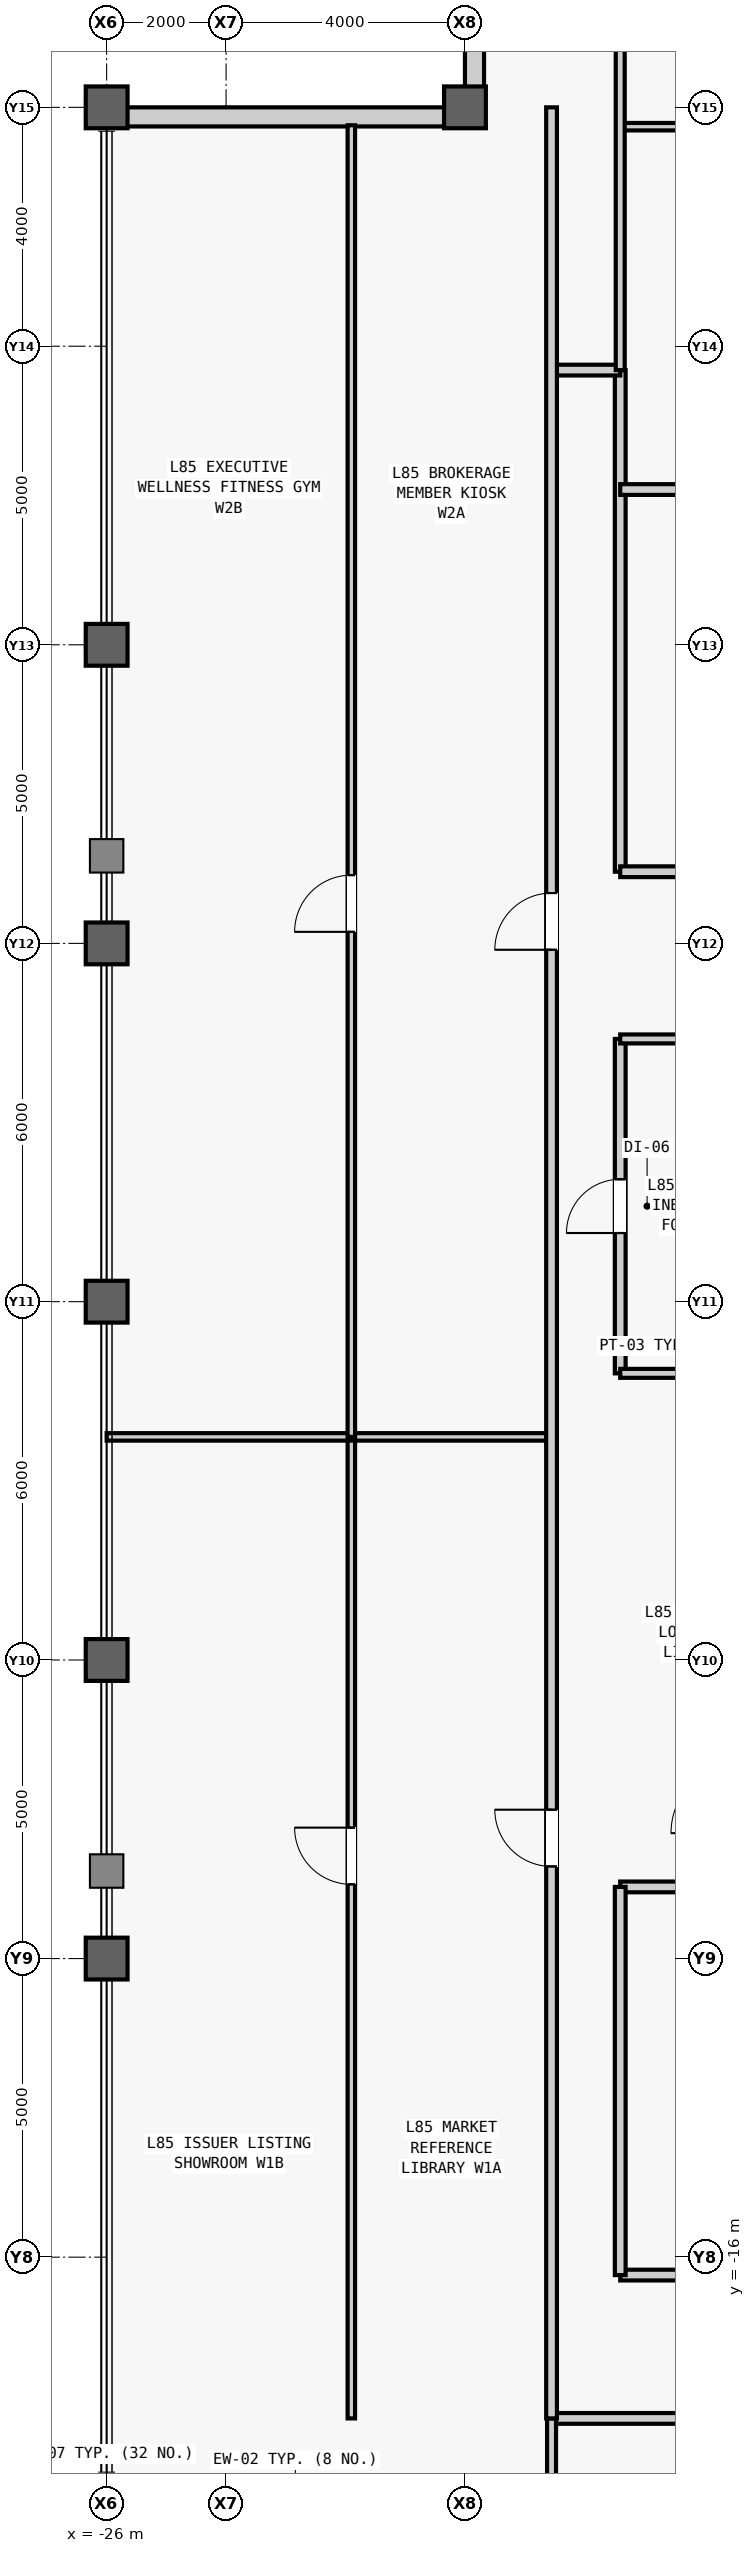
"""IFC4 building model, lengths in metres.
Left out: names, types, materials, properties, quantities, classifications, styles, units other than length and angle.
Written with IfcOpenShell. Run it as: python <this file> out.ifc"""

import sys

from ifc_helpers import new_model, si_unit, direction, frame, frame_2d, origin, origin_2d, place, context, subcontext, project, spatial, rectangle, hollow_rectangle, extrude, source, transform, mapped, element, fill, save


model = new_model("IFC4")
c1 = context("Model", 3, precision=1e-05, world=origin(), true_north=direction((0.0, 1.0)))
c2 = subcontext(c1, "Body", "Model", "MODEL_VIEW")
j1 = project(units=[si_unit("LENGTHUNIT", "METRE"), si_unit("PLANEANGLEUNIT", "RADIAN")], contexts=[c1])
p1 = place(None, origin())
s1 = spatial("IfcSite", under=j1, at=p1, CompositionType="ELEMENT")
p2 = place(p1, origin())
s2 = spatial("IfcBuilding", under=s1, at=p2, CompositionType="ELEMENT")
p3 = place(p2, frame((0.0, 0.0, 358.3)))
s3 = spatial("IfcBuildingStorey", under=s2, at=p3, CompositionType="ELEMENT", Elevation=358.3)
m1 = source(origin(), c2, "Body", "SweptSolid", [
    extrude(hollow_rectangle(XDim=0.7, YDim=0.7, WallThickness=0.04, at=origin_2d()), origin(), (0.0, 0.0, 1.0), 4.0),
])
for number, where, z_axis, x_axis in (
    (1, (-26.0, -11.0, 0.0), (0.0, 0.0, 1.0), (1.0, 0.0, 0.0)),
    (2, (-26.0, -6.0, 0.0), (0.0, 0.0, 1.0), (1.0, 0.0, 0.0)),
    (3, (-26.0, 0.0, 0.0), (0.0, 0.0, 1.0), (1.0, 0.0, 0.0)),
    (4, (-26.0, 6.0, 0.0), (0.0, 0.0, 1.0), (1.0, 0.0, 0.0)),
    (5, (-26.0, 11.0, 0.0), (0.0, 0.0, 1.0), (1.0, 0.0, 0.0)),
    (6, (-26.0, 20.0, 0.0), (0.0, 0.0, 1.0), (1.0, 0.0, 0.0)),
    (7, (-20.0, 20.0, 0.0), (0.0, 0.0, 1.0), (1.0, 0.0, 0.0)),
):
    element("IfcColumn", number, at=place(p3, frame(where, z_axis=z_axis, x_axis=x_axis)), inside=s3, PredefinedType="COLUMN", context=c2, shape_type="MappedRepresentation", body=[
        mapped(m1, transform((0.0, 0.0, 0.0), scale=1.0)),
    ])
m2 = source(origin(), c2, "Body", "SweptSolid", [
    extrude(rectangle(XDim=5.68, YDim=0.32, at=frame_2d((2.84, 0.0))), origin(), (0.0, 0.0, 1.0), 3.191),
])
p4 = place(p3, frame((-19.84, 20.0, 0.0), z_axis=(0.0, 0.0, 1.0), x_axis=(0.0, 1.0, 0.0)))
e8 = element("IfcWall", 8, at=p4, inside=s3, PredefinedType="STANDARD", context=c2, shape_type="MappedRepresentation", body=[
    mapped(m2, transform((0.0, 0.0, 0.0), scale=1.0)),
])
m3 = source(origin(), c2, "Body", "SweptSolid", [
    extrude(rectangle(XDim=1.8, YDim=2.4, at=frame_2d((0.9, 1.2))), frame((0.0, 0.17, 0.0), z_axis=(0.0, -1.0, 0.0), x_axis=(1.0, 0.0, 0.0)), (0.0, 0.0, 1.0), 0.34),
])
p5 = place(p4, frame((1.94, 0.0, 0.5)))
e9 = element("IfcOpeningElement", 9, at=p5, cuts=e8, PredefinedType="OPENING", context=c2, shape_type="MappedRepresentation", body=[
    mapped(m3, transform((0.0, 0.0, 0.0), scale=1.0)),
])
p6 = place(p3, frame((-20.0, 19.84, 0.0), z_axis=(0.0, 0.0, 1.0), x_axis=(-1.0, 0.0, 0.0)))
e10 = element("IfcWall", 10, at=p6, inside=s3, PredefinedType="STANDARD", context=c2, shape_type="MappedRepresentation", body=[
    mapped(m2, transform((0.0, 0.0, 0.0), scale=1.0)),
])
m4 = source(origin(), c2, "Body", "SweptSolid", [
    extrude(rectangle(XDim=5.6, YDim=0.18, at=frame_2d((2.8, 0.0))), origin(), (0.0, 0.0, 1.0), 3.74),
])
p7 = place(p3, frame((-17.4, -1.2, 0.0), z_axis=(0.0, 0.0, 1.0), x_axis=(0.0, 1.0, 0.0)))
e11 = element("IfcWall", 11, at=p7, inside=s3, PredefinedType="PARTITIONING", context=c2, shape_type="MappedRepresentation", body=[
    mapped(m4, transform((0.0, 0.0, 0.0), scale=1.0)),
])
m5 = source(origin(), c2, "Body", "SweptSolid", [
    extrude(rectangle(XDim=0.9, YDim=2.15, at=frame_2d((0.45, 1.075))), frame((0.0, 0.1, 0.0), z_axis=(0.0, -1.0, 0.0), x_axis=(1.0, 0.0, 0.0)), (0.0, 0.0, 1.0), 0.2),
])
p8 = place(p7, frame((2.35, 0.0, 0.0)))
e12 = element("IfcOpeningElement", 12, at=p8, cuts=e11, PredefinedType="OPENING", context=c2, shape_type="MappedRepresentation", body=[
    mapped(m5, transform((0.0, 0.0, 0.0), scale=1.0)),
])
m6 = source(origin(), c2, "Body", "SweptSolid", [
    extrude(rectangle(XDim=2.05, YDim=0.15, at=frame_2d((1.025, 0.0))), origin(), (0.0, 0.0, 1.0), 3.74),
])
for number, where, z_axis, x_axis in (
    (13, (-17.4, -1.2, 0.0), (0.0, 0.0, 1.0), (1.0, 0.0, 0.0)),
    (14, (-17.4, 4.4, 0.0), (0.0, 0.0, 1.0), (1.0, 0.0, 0.0)),
):
    element("IfcWall", number, at=place(p3, frame(where, z_axis=z_axis, x_axis=x_axis)), inside=s3, PredefinedType="PARTITIONING", context=c2, shape_type="MappedRepresentation", body=[
        mapped(m6, transform((0.0, 0.0, 0.0), scale=1.0)),
    ])
m7 = source(origin(), c2, "Body", "SweptSolid", [
    extrude(rectangle(XDim=2.05, YDim=0.18, at=frame_2d((1.025, 0.0))), origin(), (0.0, 0.0, 1.0), 3.74),
])
p9 = place(p3, frame((-17.4, -9.8, 0.0), z_axis=(0.0, 0.0, 1.0), x_axis=(1.0, 0.0, 0.0)))
e15 = element("IfcWall", 15, at=p9, inside=s3, PredefinedType="PARTITIONING", context=c2, shape_type="MappedRepresentation", body=[
    mapped(m7, transform((0.0, 0.0, 0.0), scale=1.0)),
])
m8 = source(origin(), c2, "Body", "SweptSolid", [
    extrude(rectangle(XDim=8.4, YDim=0.18, at=frame_2d((4.2, 0.0))), origin(), (0.0, 0.0, 1.0), 3.74),
])
p10 = place(p3, frame((-17.4, 7.2, 0.0), z_axis=(0.0, 0.0, 1.0), x_axis=(0.0, 1.0, 0.0)))
e16 = element("IfcWall", 16, at=p10, inside=s3, PredefinedType="PARTITIONING", context=c2, shape_type="MappedRepresentation", body=[
    mapped(m8, transform((0.0, 0.0, 0.0), scale=1.0)),
])
p11 = place(p3, frame((-17.4, 7.2, 0.0), z_axis=(0.0, 0.0, 1.0), x_axis=(1.0, 0.0, 0.0)))
e17 = element("IfcWall", 17, at=p11, inside=s3, PredefinedType="PARTITIONING", context=c2, shape_type="MappedRepresentation", body=[
    mapped(m7, transform((0.0, 0.0, 0.0), scale=1.0)),
])
m9 = source(origin(), c2, "Body", "SweptSolid", [
    extrude(rectangle(XDim=16.1, YDim=0.18, at=frame_2d((8.05, 0.0))), origin(), (0.0, 0.0, 1.0), 3.74),
])
p12 = place(p3, frame((-17.4, -16.3, 0.0), z_axis=(0.0, 0.0, 1.0), x_axis=(1.0, 0.0, 0.0)))
e18 = element("IfcWall", 18, at=p12, inside=s3, PredefinedType="PARTITIONING", context=c2, shape_type="MappedRepresentation", body=[
    mapped(m9, transform((0.0, 0.0, 0.0), scale=1.0)),
])
p13 = place(p12, frame((8.95, 0.0, 0.0)))
e19 = element("IfcOpeningElement", 19, at=p13, cuts=e18, PredefinedType="OPENING", context=c2, shape_type="MappedRepresentation", body=[
    mapped(m5, transform((0.0, 0.0, 0.0), scale=1.0)),
])
m10 = source(origin(), c2, "Body", "SweptSolid", [
    extrude(rectangle(XDim=6.5, YDim=0.18, at=frame_2d((3.25, 0.0))), origin(), (0.0, 0.0, 1.0), 3.74),
])
p14 = place(p3, frame((-17.4, -16.3, 0.0), z_axis=(0.0, 0.0, 1.0), x_axis=(0.0, 1.0, 0.0)))
e20 = element("IfcWall", 20, at=p14, inside=s3, PredefinedType="PARTITIONING", context=c2, shape_type="MappedRepresentation", body=[
    mapped(m10, transform((0.0, 0.0, 0.0), scale=1.0)),
])
m11 = source(origin(), c2, "Body", "SweptSolid", [
    extrude(rectangle(XDim=1.15, YDim=0.18, at=frame_2d((0.575, 0.0))), origin(), (0.0, 0.0, 1.0), 3.74),
])
p15 = place(p3, frame((-18.55, 15.6, 0.0), z_axis=(0.0, 0.0, 1.0), x_axis=(1.0, 0.0, 0.0)))
e21 = element("IfcWall", 21, at=p15, inside=s3, PredefinedType="PARTITIONING", context=c2, shape_type="MappedRepresentation", body=[
    mapped(m11, transform((0.0, 0.0, 0.0), scale=1.0)),
])
m12 = source(origin(), c2, "Body", "SweptSolid", [
    extrude(rectangle(XDim=36.3, YDim=0.18, at=frame_2d((18.15, 0.0))), origin(), (0.0, 0.0, 1.0), 3.74),
])
p16 = place(p3, frame((-18.55, -18.7, 0.0), z_axis=(0.0, 0.0, 1.0), x_axis=(1.0, 0.0, 0.0)))
e22 = element("IfcWall", 22, at=p16, inside=s3, PredefinedType="PARTITIONING", context=c2, shape_type="MappedRepresentation", body=[
    mapped(m12, transform((0.0, 0.0, 0.0), scale=1.0)),
])
m13 = source(origin(), c2, "Body", "SweptSolid", [
    extrude(rectangle(XDim=1.05, YDim=2.2, at=frame_2d((0.525, 1.1))), frame((0.0, 0.1, 0.0), z_axis=(0.0, -1.0, 0.0), x_axis=(1.0, 0.0, 0.0)), (0.0, 0.0, 1.0), 0.2),
])
p17 = place(p16, frame((17.6, 0.0, 0.0)))
e23 = element("IfcOpeningElement", 23, at=p17, cuts=e22, PredefinedType="OPENING", context=c2, shape_type="MappedRepresentation", body=[
    mapped(m13, transform((0.0, 0.0, 0.0), scale=1.0)),
])
m14 = source(origin(), c2, "Body", "SweptSolid", [
    extrude(rectangle(XDim=7.3, YDim=0.15, at=frame_2d((3.65, 0.0))), origin(), (0.0, 0.0, 1.0), 3.74),
])
p18 = place(p3, frame((-18.55, -26.0, 0.0), z_axis=(0.0, 0.0, 1.0), x_axis=(0.0, 1.0, 0.0)))
e24 = element("IfcWall", 24, at=p18, inside=s3, PredefinedType="PARTITIONING", context=c2, shape_type="MappedRepresentation", body=[
    mapped(m14, transform((0.0, 0.0, 0.0), scale=1.0)),
])
m15 = source(origin(), c2, "Body", "SweptSolid", [
    extrude(rectangle(XDim=7.205, YDim=0.125, at=frame_2d((3.603, 0.0))), origin(), (0.0, 0.0, 1.0), 3.393),
])
p19 = place(p3, frame((-17.4, 19.676, 0.0), z_axis=(0.0, 0.0, 1.0), x_axis=(1.0, 0.0, 0.0)))
e25 = element("IfcWall", 25, at=p19, inside=s3, PredefinedType="PARTITIONING", context=c2, shape_type="MappedRepresentation", body=[
    mapped(m15, transform((0.0, 0.0, 0.0), scale=1.0)),
])
m16 = source(origin(), c2, "Body", "SweptSolid", [
    extrude(rectangle(XDim=0.95, YDim=2.15, at=frame_2d((0.475, 1.075))), frame((0.0, 0.073, 0.0), z_axis=(0.0, -1.0, 0.0), x_axis=(1.0, 0.0, 0.0)), (0.0, 0.0, 1.0), 0.145),
])
p20 = place(p19, frame((3.127, 0.0, 0.0)))
e26 = element("IfcOpeningElement", 26, at=p20, cuts=e25, PredefinedType="OPENING", context=c2, shape_type="MappedRepresentation", body=[
    mapped(m16, transform((0.0, 0.0, 0.0), scale=1.0)),
])
m17 = source(origin(), c2, "Body", "SweptSolid", [
    extrude(rectangle(XDim=32.75, YDim=0.18, at=frame_2d((16.375, 0.0))), origin(), (0.0, 0.0, 1.0), 3.74),
])
p21 = place(p3, frame((-17.4, 13.6, 0.0), z_axis=(0.0, 0.0, 1.0), x_axis=(1.0, 0.0, 0.0)))
e27 = element("IfcWall", 27, at=p21, inside=s3, PredefinedType="PARTITIONING", context=c2, shape_type="MappedRepresentation", body=[
    mapped(m17, transform((0.0, 0.0, 0.0), scale=1.0)),
])
p22 = place(p21, frame((23.948, 0.0, 0.0)))
e28 = element("IfcOpeningElement", 28, at=p22, cuts=e27, PredefinedType="OPENING", context=c2, shape_type="MappedRepresentation", body=[
    mapped(m13, transform((0.0, 0.0, 0.0), scale=1.0)),
])
p23 = place(p21, frame((28.147, 0.0, 0.0)))
e29 = element("IfcOpeningElement", 29, at=p23, cuts=e27, PredefinedType="OPENING", context=c2, shape_type="MappedRepresentation", body=[
    mapped(m13, transform((0.0, 0.0, 0.0), scale=1.0)),
])
m18 = source(origin(), c2, "Body", "SweptSolid", [
    extrude(rectangle(XDim=10.4, YDim=0.15, at=frame_2d((5.2, 0.0))), origin(), (0.0, 0.0, 1.0), 3.74),
])
p24 = place(p3, frame((-17.4, 15.6, 0.0), z_axis=(0.0, 0.0, 1.0), x_axis=(0.0, 1.0, 0.0)))
e30 = element("IfcWall", 30, at=p24, inside=s3, PredefinedType="PARTITIONING", context=c2, shape_type="MappedRepresentation", body=[
    mapped(m18, transform((0.0, 0.0, 0.0), scale=1.0)),
])
m19 = source(origin(), c2, "Body", "SweptSolid", [
    extrude(rectangle(XDim=16.436, YDim=0.125, at=frame_2d((8.218, 0.0))), origin(), (0.0, 0.0, 1.0), 3.74),
])
p25 = place(p3, frame((-21.903, -18.7, 0.0), z_axis=(0.0, 0.0, 1.0), x_axis=(0.0, 1.0, 0.0)))
e31 = element("IfcWall", 31, at=p25, inside=s3, PredefinedType="PARTITIONING", context=c2, shape_type="MappedRepresentation", body=[
    mapped(m19, transform((0.0, 0.0, 0.0), scale=1.0)),
])
p26 = place(p25, frame((8.943, 0.0, 0.0)))
e32 = element("IfcOpeningElement", 32, at=p26, cuts=e31, PredefinedType="OPENING", context=c2, shape_type="MappedRepresentation", body=[
    mapped(m16, transform((0.0, 0.0, 0.0), scale=1.0)),
])
m20 = source(origin(), c2, "Body", "SweptSolid", [
    extrude(rectangle(XDim=7.45, YDim=0.125, at=frame_2d((3.725, 0.0))), origin(), (0.0, 0.0, 1.0), 3.74),
])
p27 = place(p3, frame((-26.0, -2.264, 0.0), z_axis=(0.0, 0.0, 1.0), x_axis=(1.0, 0.0, 0.0)))
e33 = element("IfcWall", 33, at=p27, inside=s3, PredefinedType="PARTITIONING", context=c2, shape_type="MappedRepresentation", body=[
    mapped(m20, transform((0.0, 0.0, 0.0), scale=1.0)),
])
m21 = source(origin(), c2, "Body", "SweptSolid", [
    extrude(rectangle(XDim=21.964, YDim=0.125, at=frame_2d((10.982, 0.0))), origin(), (0.0, 0.0, 1.0), 3.74),
])
p28 = place(p3, frame((-21.903, -2.264, 0.0), z_axis=(0.0, 0.0, 1.0), x_axis=(0.0, 1.0, 0.0)))
e34 = element("IfcWall", 34, at=p28, inside=s3, PredefinedType="PARTITIONING", context=c2, shape_type="MappedRepresentation", body=[
    mapped(m21, transform((0.0, 0.0, 0.0), scale=1.0)),
])
p29 = place(p28, frame((8.457, 0.0, 0.0)))
e35 = element("IfcOpeningElement", 35, at=p29, cuts=e34, PredefinedType="OPENING", context=c2, shape_type="MappedRepresentation", body=[
    mapped(m16, transform((0.0, 0.0, 0.0), scale=1.0)),
])
m22 = source(origin(), c2, "Body", "SweptSolid", [
    extrude(rectangle(XDim=38.7, YDim=0.18, at=frame_2d((19.35, 0.0))), origin(), (0.0, 0.0, 1.0), 3.74),
])
p30 = place(p3, frame((-18.55, -18.7, 0.0), z_axis=(0.0, 0.0, 1.0), x_axis=(0.0, 1.0, 0.0)))
e36 = element("IfcWall", 36, at=p30, inside=s3, PredefinedType="PARTITIONING", context=c2, shape_type="MappedRepresentation", body=[
    mapped(m22, transform((0.0, 0.0, 0.0), scale=1.0)),
])
m23 = source(origin(), c2, "Body", "SweptSolid", [
    extrude(rectangle(XDim=0.95, YDim=2.15, at=frame_2d((0.475, 1.075))), frame((0.0, 0.1, 0.0), z_axis=(0.0, -1.0, 0.0), x_axis=(1.0, 0.0, 0.0)), (0.0, 0.0, 1.0), 0.2),
])
p31 = place(p30, frame((9.243, 0.0, 0.0)))
e37 = element("IfcOpeningElement", 37, at=p31, cuts=e36, PredefinedType="OPENING", context=c2, shape_type="MappedRepresentation", body=[
    mapped(m23, transform((0.0, 0.0, 0.0), scale=1.0)),
])
p32 = place(p30, frame((24.593, 0.0, 0.0)))
e38 = element("IfcOpeningElement", 38, at=p32, cuts=e36, PredefinedType="OPENING", context=c2, shape_type="MappedRepresentation", body=[
    mapped(m23, transform((0.0, 0.0, 0.0), scale=1.0)),
])
m24 = source(origin(), c2, "Body", "SweptSolid", [
    extrude(rectangle(XDim=0.9, YDim=2.15, at=frame_2d((0.45, 1.075))), frame((0.0, 0.025, 0.0), z_axis=(0.0, -1.0, 0.0), x_axis=(1.0, 0.0, 0.0)), (0.0, 0.0, 1.0), 0.05),
])
p33 = place(p8, origin())
e39 = element("IfcDoor", 39, at=p33, inside=s3, OperationType="SINGLE_SWING_LEFT", PredefinedType="DOOR", context=c2, shape_type="MappedRepresentation", body=[
    mapped(m24, transform((0.0, 0.0, 0.0), scale=1.0)),
])
fill(e12, e39)
m25 = source(origin(), c2, "Body", "SweptSolid", [
    extrude(rectangle(XDim=0.95, YDim=2.15, at=frame_2d((0.475, 1.075))), frame((0.0, 0.025, 0.0), z_axis=(0.0, -1.0, 0.0), x_axis=(1.0, 0.0, 0.0)), (0.0, 0.0, 1.0), 0.05),
])
p34 = place(p26, origin())
e40 = element("IfcDoor", 40, at=p34, inside=s3, OperationType="SINGLE_SWING_RIGHT", PredefinedType="DOOR", context=c2, shape_type="MappedRepresentation", body=[
    mapped(m25, transform((0.0, 0.0, 0.0), scale=1.0)),
])
fill(e32, e40)
p35 = place(p29, origin())
e41 = element("IfcDoor", 41, at=p35, inside=s3, OperationType="SINGLE_SWING_LEFT", PredefinedType="DOOR", context=c2, shape_type="MappedRepresentation", body=[
    mapped(m25, transform((0.0, 0.0, 0.0), scale=1.0)),
])
fill(e35, e41)
p36 = place(p31, origin())
e42 = element("IfcDoor", 42, at=p36, inside=s3, OperationType="SINGLE_SWING_RIGHT", PredefinedType="DOOR", context=c2, shape_type="MappedRepresentation", body=[
    mapped(m25, transform((0.0, 0.0, 0.0), scale=1.0)),
])
fill(e37, e42)
p37 = place(p32, origin())
e43 = element("IfcDoor", 43, at=p37, inside=s3, OperationType="SINGLE_SWING_LEFT", PredefinedType="DOOR", context=c2, shape_type="MappedRepresentation", body=[
    mapped(m25, transform((0.0, 0.0, 0.0), scale=1.0)),
])
fill(e38, e43)
save(model, sys.argv[1])
